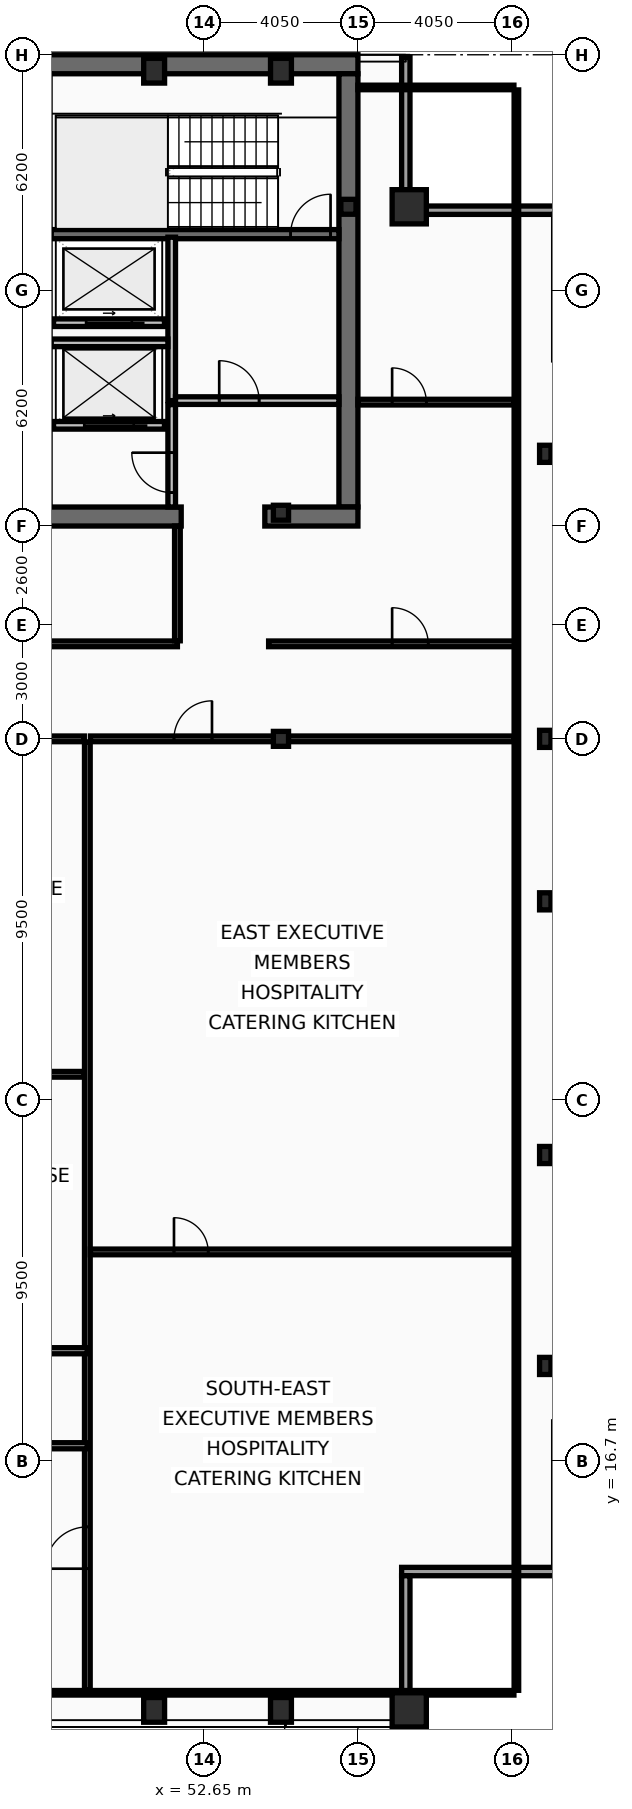
"""IFC4 building model, lengths in metres.
Left out: names, types, materials, properties, quantities, classifications, styles, units other than length and angle.
Written with IfcOpenShell. Run it as: python <this file> out.ifc"""

import sys

from ifc_helpers import new_model, si_unit, direction, frame, frame_2d, origin, origin_2d, place, context, subcontext, project, spatial, rectangle, hollow_rectangle, i_section, extrude, element, fill, save


model = new_model("IFC4")
c1 = context("Model", 3, precision=1e-05, world=origin(), true_north=direction((0.0, 1.0)))
c2 = subcontext(c1, "Body", "Model", "MODEL_VIEW")
j1 = project(units=[si_unit("LENGTHUNIT", "METRE"), si_unit("PLANEANGLEUNIT", "RADIAN")], contexts=[c1])
p1 = place(None, origin())
s1 = spatial("IfcSite", under=j1, at=p1, CompositionType="ELEMENT")
p2 = place(p1, origin())
s2 = spatial("IfcBuilding", under=s1, at=p2, CompositionType="ELEMENT")
p3 = place(p2, frame((0.0, 0.0, 314.6)))
s3 = spatial("IfcBuildingStorey", under=s2, at=p3, CompositionType="ELEMENT", Elevation=314.6)
p4 = place(p3, frame((16.2, 53.45, 0.0), z_axis=(0.0, 0.0, 1.0), x_axis=(1.0, 0.0, 0.0)))
e1 = element("IfcWall", 1, at=p4, inside=s3, PredefinedType="SHEAR", context=c2, shape_type="SweptSolid", body=[
    extrude(rectangle(XDim=40.5, YDim=0.5, at=frame_2d((20.25, 0.0))), origin(), (0.0, 0.0, 1.0), 3.44),
])
p5 = place(p3, frame((56.45, 53.2, 0.0), z_axis=(0.0, 0.0, 1.0), x_axis=(0.0, -1.0, 0.0)))
e2 = element("IfcWall", 2, at=p5, inside=s3, PredefinedType="SHEAR", context=c2, shape_type="SweptSolid", body=[
    extrude(rectangle(XDim=11.4, YDim=0.5, at=frame_2d((5.7, 0.0))), origin(), (0.0, 0.0, 1.0), 3.44),
])
p6 = place(p3, frame((52.05, 41.55, 0.0), z_axis=(0.0, 0.0, 1.0), x_axis=(-1.0, 0.0, 0.0)))
e3 = element("IfcWall", 3, at=p6, inside=s3, PredefinedType="SHEAR", context=c2, shape_type="SweptSolid", body=[
    extrude(rectangle(XDim=11.3, YDim=0.5, at=frame_2d((5.65, 0.0))), origin(), (0.0, 0.0, 1.0), 3.44),
])
p7 = place(p3, frame((56.7, 41.55, 0.0), z_axis=(0.0, 0.0, 1.0), x_axis=(-1.0, 0.0, 0.0)))
e4 = element("IfcWall", 4, at=p7, inside=s3, PredefinedType="SHEAR", context=c2, shape_type="SweptSolid", body=[
    extrude(rectangle(XDim=2.45, YDim=0.5, at=frame_2d((1.225, 0.0))), origin(), (0.0, 0.0, 1.0), 3.44),
])
p8 = place(p3, frame((48.63, 48.98, 0.0), z_axis=(0.0, 0.0, 1.0), x_axis=(1.0, 0.0, 0.0)))
e5 = element("IfcWall", 5, at=p8, inside=s3, PredefinedType="SHEAR", context=c2, shape_type="SweptSolid", body=[
    extrude(rectangle(XDim=7.57, YDim=0.24, at=frame_2d((3.785, 0.0))), origin(), (0.0, 0.0, 1.0), 3.44),
])
p9 = place(p8, frame((6.3, 0.0, 0.0)))
e6 = element("IfcOpeningElement", 6, at=p9, cuts=e5, PredefinedType="OPENING", context=c2, shape_type="SweptSolid", body=[
    extrude(rectangle(XDim=1.05, YDim=2.15, at=frame_2d((0.525, 1.075))), frame((0.0, 0.13, 0.0), z_axis=(0.0, -1.0, 0.0), x_axis=(1.0, 0.0, 0.0)), (0.0, 0.0, 1.0), 0.26),
])
for number, where, z_axis, x_axis in (
    (7, (58.05, 10.15, 0.0), (0.0, 0.0, 1.0), (1.0, 0.0, 0.0)),
    (8, (58.05, 49.7, 0.0), (0.0, 0.0, 1.0), (1.0, 0.0, 0.0)),
):
    element("IfcColumn", number, at=place(p3, frame(where, z_axis=z_axis, x_axis=x_axis)), inside=s3, PredefinedType="COLUMN", context=c2, shape_type="SweptSolid", body=[
        extrude(hollow_rectangle(XDim=0.9, YDim=0.9, WallThickness=0.05, at=origin_2d()), origin(), (0.0, 0.0, 1.0), 3.6),
    ])
for number, where, z_axis, x_axis in (
    (9, (51.337, 10.15, 0.0), (0.0, 0.0, 1.0), (1.0, 0.0, 0.0)),
    (10, (54.675, 10.15, 0.0), (0.0, 0.0, 1.0), (1.0, 0.0, 0.0)),
    (11, (51.337, 53.28, 0.0), (0.0, 0.0, 1.0), (1.0, 0.0, 0.0)),
    (12, (54.675, 53.28, 0.0), (0.0, 0.0, 1.0), (1.0, 0.0, 0.0)),
):
    element("IfcColumn", number, at=place(p3, frame(where, z_axis=z_axis, x_axis=x_axis)), inside=s3, PredefinedType="COLUMN", context=c2, shape_type="SweptSolid", body=[
        extrude(hollow_rectangle(XDim=0.55, YDim=0.65, WallThickness=0.04, at=origin_2d()), origin(), (0.0, 0.0, 1.0), 3.6),
    ])
for number, where, z_axis, x_axis in (
    (13, (61.63, 19.2, 0.0), (0.0, 0.0, 1.0), (1.0, 0.0, 0.0)),
    (14, (61.63, 24.75, 0.0), (0.0, 0.0, 1.0), (1.0, 0.0, 0.0)),
    (15, (61.63, 31.425, 0.0), (0.0, 0.0, 1.0), (1.0, 0.0, 0.0)),
    (16, (61.63, 35.7, 0.0), (0.0, 0.0, 1.0), (1.0, 0.0, 0.0)),
    (17, (61.63, 43.2, 0.0), (0.0, 0.0, 1.0), (1.0, 0.0, 0.0)),
):
    element("IfcColumn", number, at=place(p3, frame(where, z_axis=z_axis, x_axis=x_axis)), inside=s3, PredefinedType="COLUMN", context=c2, shape_type="SweptSolid", body=[
        extrude(i_section(OverallWidth=0.3, OverallDepth=0.45, WebThickness=0.014, FlangeThickness=0.026, at=origin_2d()), origin(), (0.0, 0.0, 1.0), 3.6),
    ])
for number, where, z_axis, x_axis in (
    (18, (56.45, 49.7, 0.0), (0.0, 0.0, 1.0), (1.0, 0.0, 0.0)),
    (19, (54.675, 35.7, 0.0), (0.0, 0.0, 1.0), (1.0, 0.0, 0.0)),
    (20, (54.675, 41.65, 0.0), (0.0, 0.0, 1.0), (1.0, 0.0, 0.0)),
):
    element("IfcColumn", number, at=place(p3, frame(where, z_axis=z_axis, x_axis=x_axis)), inside=s3, PredefinedType="COLUMN", context=c2, shape_type="SweptSolid", body=[
        extrude(i_section(OverallWidth=0.399, OverallDepth=0.393, WebThickness=0.023, FlangeThickness=0.037, at=origin_2d()), origin(), (0.0, 0.0, 1.0), 3.6),
    ])
p10 = place(p3, frame((57.96, 53.63, 0.0), z_axis=(0.0, 0.0, 1.0), x_axis=(0.0, -1.0, 0.0)))
e21 = element("IfcWall", 21, at=p10, inside=s3, PredefinedType="SOLIDWALL", context=c2, shape_type="SweptSolid", body=[
    extrude(rectangle(XDim=3.91, YDim=0.22, at=frame_2d((1.955, 0.0))), origin(), (0.0, 0.0, 1.0), 2.88),
])
for number, where, z_axis, x_axis in (
    (22, (57.85, 49.61, 0.0), (0.0, 0.0, 1.0), (1.0, 0.0, 0.0)),
    (23, (62.07, 13.79, 0.0), (0.0, 0.0, 1.0), (-1.0, 0.0, 0.0)),
):
    element("IfcWall", number, at=place(p3, frame(where, z_axis=z_axis, x_axis=x_axis)), inside=s3, PredefinedType="SOLIDWALL", context=c2, shape_type="SweptSolid", body=[
        extrude(rectangle(XDim=4.22, YDim=0.22, at=frame_2d((2.11, 0.0))), origin(), (0.0, 0.0, 1.0), 2.88),
    ])
p11 = place(p3, frame((57.96, 13.68, 0.0), z_axis=(0.0, 0.0, 1.0), x_axis=(0.0, -1.0, 0.0)))
e24 = element("IfcWall", 24, at=p11, inside=s3, PredefinedType="SOLIDWALL", context=c2, shape_type="SweptSolid", body=[
    extrude(rectangle(XDim=3.91, YDim=0.22, at=frame_2d((1.955, 0.0))), origin(), (0.0, 0.0, 1.0), 2.88),
])
p12 = place(p3, frame((51.61, 43.95, 0.0), z_axis=(0.0, 0.0, 1.0), x_axis=(-1.0, 0.0, 0.0)))
e25 = element("IfcWall", 25, at=p12, inside=s3, PredefinedType="PARTITIONING", context=c2, shape_type="SweptSolid", body=[
    extrude(rectangle(XDim=2.92, YDim=0.2, at=frame_2d((1.46, 0.0))), origin(), (0.0, 0.0, 1.0), 3.44),
])
p13 = place(p12, frame((0.81, 0.0, 0.0)))
e26 = element("IfcOpeningElement", 26, at=p13, cuts=e25, PredefinedType="OPENING", context=c2, shape_type="SweptSolid", body=[
    extrude(rectangle(XDim=1.3, YDim=2.18, at=frame_2d((0.65, 1.09))), frame((0.0, 0.11, 0.0), z_axis=(0.0, -1.0, 0.0), x_axis=(1.0, 0.0, 0.0)), (0.0, 0.0, 1.0), 0.22),
])
p14 = place(p3, frame((51.61, 46.65, 0.0), z_axis=(0.0, 0.0, 1.0), x_axis=(-1.0, 0.0, 0.0)))
e27 = element("IfcWall", 27, at=p14, inside=s3, PredefinedType="PARTITIONING", context=c2, shape_type="SweptSolid", body=[
    extrude(rectangle(XDim=2.92, YDim=0.2, at=frame_2d((1.46, 0.0))), origin(), (0.0, 0.0, 1.0), 3.44),
])
p15 = place(p14, frame((0.86, 0.0, 0.0)))
e28 = element("IfcOpeningElement", 28, at=p15, cuts=e27, PredefinedType="OPENING", context=c2, shape_type="SweptSolid", body=[
    extrude(rectangle(XDim=1.2, YDim=2.18, at=frame_2d((0.6, 1.09))), frame((0.0, 0.11, 0.0), z_axis=(0.0, -1.0, 0.0), x_axis=(1.0, 0.0, 0.0)), (0.0, 0.0, 1.0), 0.22),
])
p16 = place(p3, frame((51.8, 44.6, 0.0), z_axis=(0.0, 0.0, 1.0), x_axis=(0.0, 1.0, 0.0)))
e29 = element("IfcWall", 29, at=p16, inside=s3, PredefinedType="PARTITIONING", context=c2, shape_type="SweptSolid", body=[
    extrude(rectangle(XDim=4.3, YDim=0.2, at=frame_2d((2.15, 0.0))), origin(), (0.0, 0.0, 1.0), 3.44),
])
p17 = place(p3, frame((51.9, 44.6, 0.0), z_axis=(0.0, 0.0, 1.0), x_axis=(1.0, 0.0, 0.0)))
e30 = element("IfcWall", 30, at=p17, inside=s3, PredefinedType="PARTITIONING", context=c2, shape_type="SweptSolid", body=[
    extrude(rectangle(XDim=4.3, YDim=0.2, at=frame_2d((2.15, 0.0))), origin(), (0.0, 0.0, 1.0), 3.44),
])
p18 = place(p17, frame((1.15, 0.0, 0.0)))
e31 = element("IfcOpeningElement", 31, at=p18, cuts=e30, PredefinedType="OPENING", context=c2, shape_type="SweptSolid", body=[
    extrude(rectangle(XDim=1.05, YDim=2.15, at=frame_2d((0.525, 1.075))), frame((0.0, 0.11, 0.0), z_axis=(0.0, -1.0, 0.0), x_axis=(1.0, 0.0, 0.0)), (0.0, 0.0, 1.0), 0.22),
])
p19 = place(p3, frame((48.63, 46.12, 0.0), z_axis=(0.0, 0.0, 1.0), x_axis=(1.0, 0.0, 0.0)))
e32 = element("IfcWall", 32, at=p19, inside=s3, PredefinedType="PARTITIONING", context=c2, shape_type="SweptSolid", body=[
    extrude(rectangle(XDim=3.07, YDim=0.2, at=frame_2d((1.535, 0.0))), origin(), (0.0, 0.0, 1.0), 3.44),
])
p20 = place(p3, frame((51.8, 41.8, 0.0), z_axis=(0.0, 0.0, 1.0), x_axis=(0.0, 1.0, 0.0)))
e33 = element("IfcWall", 33, at=p20, inside=s3, PredefinedType="PARTITIONING", context=c2, shape_type="SweptSolid", body=[
    extrude(rectangle(XDim=2.695, YDim=0.2, at=frame_2d((1.348, 0.0))), origin(), (0.0, 0.0, 1.0), 3.44),
])
p21 = place(p20, frame((0.38, 0.0, 0.0)))
e34 = element("IfcOpeningElement", 34, at=p21, cuts=e33, PredefinedType="OPENING", context=c2, shape_type="SweptSolid", body=[
    extrude(rectangle(XDim=1.05, YDim=2.15, at=frame_2d((0.525, 1.075))), frame((0.0, 0.11, 0.0), z_axis=(0.0, -1.0, 0.0), x_axis=(1.0, 0.0, 0.0)), (0.0, 0.0, 1.0), 0.22),
])
p22 = place(p3, frame((46.3, 38.2, 0.0), z_axis=(0.0, 0.0, 1.0), x_axis=(1.0, 0.0, 0.0)))
e35 = element("IfcWall", 35, at=p22, inside=s3, PredefinedType="PARTITIONING", context=c2, shape_type="SweptSolid", body=[
    extrude(rectangle(XDim=5.65, YDim=0.15, at=frame_2d((2.825, 0.0))), origin(), (0.0, 0.0, 1.0), 2.83),
])
p23 = place(p22, frame((1.1, 0.0, 0.0)))
e36 = element("IfcOpeningElement", 36, at=p23, cuts=e35, PredefinedType="OPENING", context=c2, shape_type="SweptSolid", body=[
    extrude(rectangle(XDim=1.0, YDim=2.05, at=frame_2d((0.5, 1.025))), frame((0.0, 0.085, 0.0), z_axis=(0.0, -1.0, 0.0), x_axis=(1.0, 0.0, 0.0)), (0.0, 0.0, 1.0), 0.17),
])
p24 = place(p3, frame((51.95, 38.28, 0.0), z_axis=(0.0, 0.0, 1.0), x_axis=(0.0, 1.0, 0.0)))
e37 = element("IfcWall", 37, at=p24, inside=s3, PredefinedType="PARTITIONING", context=c2, shape_type="SweptSolid", body=[
    extrude(rectangle(XDim=3.02, YDim=0.15, at=frame_2d((1.51, 0.0))), origin(), (0.0, 0.0, 1.0), 3.44),
])
p25 = place(p3, frame((54.35, 38.2, 0.0), z_axis=(0.0, 0.0, 1.0), x_axis=(1.0, 0.0, 0.0)))
e38 = element("IfcWall", 38, at=p25, inside=s3, PredefinedType="PARTITIONING", context=c2, shape_type="SweptSolid", body=[
    extrude(rectangle(XDim=6.52, YDim=0.15, at=frame_2d((3.26, 0.0))), origin(), (0.0, 0.0, 1.0), 2.83),
])
p26 = place(p25, frame((3.25, 0.0, 0.0)))
e39 = element("IfcOpeningElement", 39, at=p26, cuts=e38, PredefinedType="OPENING", context=c2, shape_type="SweptSolid", body=[
    extrude(rectangle(XDim=0.95, YDim=2.05, at=frame_2d((0.475, 1.025))), frame((0.0, 0.085, 0.0), z_axis=(0.0, -1.0, 0.0), x_axis=(1.0, 0.0, 0.0)), (0.0, 0.0, 1.0), 0.17),
])
p27 = place(p3, frame((56.7, 44.56, 0.0), z_axis=(0.0, 0.0, 1.0), x_axis=(1.0, 0.0, 0.0)))
e40 = element("IfcWall", 40, at=p27, inside=s3, PredefinedType="PARTITIONING", context=c2, shape_type="SweptSolid", body=[
    extrude(rectangle(XDim=4.105, YDim=0.15, at=frame_2d((2.052, 0.0))), origin(), (0.0, 0.0, 1.0), 2.88),
])
p28 = place(p27, frame((0.9, 0.0, 0.0)))
e41 = element("IfcOpeningElement", 41, at=p28, cuts=e40, PredefinedType="OPENING", context=c2, shape_type="SweptSolid", body=[
    extrude(rectangle(XDim=0.9, YDim=2.05, at=frame_2d((0.45, 1.025))), frame((0.0, 0.085, 0.0), z_axis=(0.0, -1.0, 0.0), x_axis=(1.0, 0.0, 0.0)), (0.0, 0.0, 1.0), 0.17),
])
p29 = place(p3, frame((49.58, 10.665, 0.0), z_axis=(0.0, 0.0, 1.0), x_axis=(0.0, 1.0, 0.0)))
e42 = element("IfcWall", 42, at=p29, inside=s3, PredefinedType="PARTITIONING", context=c2, shape_type="SweptSolid", body=[
    extrude(rectangle(XDim=24.955, YDim=0.15, at=frame_2d((12.478, 0.0))), origin(), (0.0, 0.0, 1.0), 3.07),
])
p30 = place(p29, frame((3.2, 0.0, 0.0)))
e43 = element("IfcOpeningElement", 43, at=p30, cuts=e42, PredefinedType="OPENING", context=c2, shape_type="SweptSolid", body=[
    extrude(rectangle(XDim=1.1, YDim=2.1, at=frame_2d((0.55, 1.05))), frame((0.0, 0.085, 0.0), z_axis=(0.0, -1.0, 0.0), x_axis=(1.0, 0.0, 0.0)), (0.0, 0.0, 1.0), 0.17),
])
p31 = place(p3, frame((24.48, 35.7, 0.0), z_axis=(0.0, 0.0, 1.0), x_axis=(1.0, 0.0, 0.0)))
e44 = element("IfcWall", 44, at=p31, inside=s3, PredefinedType="PARTITIONING", context=c2, shape_type="SweptSolid", body=[
    extrude(rectangle(XDim=25.02, YDim=0.15, at=frame_2d((12.51, 0.0))), origin(), (0.0, 0.0, 1.0), 2.83),
])
p32 = place(p3, frame((49.66, 35.7, 0.0), z_axis=(0.0, 0.0, 1.0), x_axis=(1.0, 0.0, 0.0)))
e45 = element("IfcWall", 45, at=p32, inside=s3, PredefinedType="PARTITIONING", context=c2, shape_type="SweptSolid", body=[
    extrude(rectangle(XDim=11.145, YDim=0.15, at=frame_2d((5.573, 0.0))), origin(), (0.0, 0.0, 1.0), 2.83),
])
p33 = place(p32, frame((2.2, 0.0, 0.0)))
e46 = element("IfcOpeningElement", 46, at=p33, cuts=e45, PredefinedType="OPENING", context=c2, shape_type="SweptSolid", body=[
    extrude(rectangle(XDim=1.0, YDim=2.05, at=frame_2d((0.5, 1.025))), frame((0.0, 0.085, 0.0), z_axis=(0.0, -1.0, 0.0), x_axis=(1.0, 0.0, 0.0)), (0.0, 0.0, 1.0), 0.17),
])
p34 = place(p3, frame((49.66, 22.2, 0.0), z_axis=(0.0, 0.0, 1.0), x_axis=(1.0, 0.0, 0.0)))
e47 = element("IfcWall", 47, at=p34, inside=s3, PredefinedType="PARTITIONING", context=c2, shape_type="SweptSolid", body=[
    extrude(rectangle(XDim=11.145, YDim=0.15, at=frame_2d((5.573, 0.0))), origin(), (0.0, 0.0, 1.0), 2.83),
])
p35 = place(p34, frame((2.2, 0.0, 0.0)))
e48 = element("IfcOpeningElement", 48, at=p35, cuts=e47, PredefinedType="OPENING", context=c2, shape_type="SweptSolid", body=[
    extrude(rectangle(XDim=0.9, YDim=2.05, at=frame_2d((0.45, 1.025))), frame((0.0, 0.085, 0.0), z_axis=(0.0, -1.0, 0.0), x_axis=(1.0, 0.0, 0.0)), (0.0, 0.0, 1.0), 0.17),
])
p36 = place(p3, frame((42.65, 19.6, 0.0), z_axis=(0.0, 0.0, 1.0), x_axis=(1.0, 0.0, 0.0)))
e49 = element("IfcWall", 49, at=p36, inside=s3, PredefinedType="PARTITIONING", context=c2, shape_type="SweptSolid", body=[
    extrude(rectangle(XDim=6.93, YDim=0.16, at=frame_2d((3.465, 0.0))), origin(), (0.0, 0.0, 1.0), 2.83),
])
p37 = place(p36, frame((3.161, 0.0, 0.0)))
e50 = element("IfcOpeningElement", 50, at=p37, cuts=e49, PredefinedType="OPENING", context=c2, shape_type="SweptSolid", body=[
    extrude(rectangle(XDim=1.0, YDim=2.05, at=frame_2d((0.5, 1.025))), frame((0.0, 0.09, 0.0), z_axis=(0.0, -1.0, 0.0), x_axis=(1.0, 0.0, 0.0)), (0.0, 0.0, 1.0), 0.18),
])
p38 = place(p3, frame((42.73, 26.874, 0.0), z_axis=(0.0, 0.0, 1.0), x_axis=(1.0, 0.0, 0.0)))
e51 = element("IfcWall", 51, at=p38, inside=s3, PredefinedType="PARTITIONING", context=c2, shape_type="SweptSolid", body=[
    extrude(rectangle(XDim=6.77, YDim=0.15, at=frame_2d((3.385, 0.0))), origin(), (0.0, 0.0, 1.0), 2.83),
])
p39 = place(p38, frame((3.119, 0.0, 0.0)))
e52 = element("IfcOpeningElement", 52, at=p39, cuts=e51, PredefinedType="OPENING", context=c2, shape_type="SweptSolid", body=[
    extrude(rectangle(XDim=0.9, YDim=2.05, at=frame_2d((0.45, 1.025))), frame((0.0, 0.085, 0.0), z_axis=(0.0, -1.0, 0.0), x_axis=(1.0, 0.0, 0.0)), (0.0, 0.0, 1.0), 0.17),
])
p40 = place(p3, frame((40.32, 17.1, 0.0), z_axis=(0.0, 0.0, 1.0), x_axis=(1.0, 0.0, 0.0)))
e53 = element("IfcWall", 53, at=p40, inside=s3, PredefinedType="PARTITIONING", context=c2, shape_type="SweptSolid", body=[
    extrude(rectangle(XDim=9.26, YDim=0.16, at=frame_2d((4.63, 0.0))), origin(), (0.0, 0.0, 1.0), 2.83),
])
p41 = place(p40, frame((4.139, 0.0, 0.0)))
e54 = element("IfcOpeningElement", 54, at=p41, cuts=e53, PredefinedType="OPENING", context=c2, shape_type="SweptSolid", body=[
    extrude(rectangle(XDim=1.0, YDim=2.05, at=frame_2d((0.5, 1.025))), frame((0.0, 0.09, 0.0), z_axis=(0.0, -1.0, 0.0), x_axis=(1.0, 0.0, 0.0)), (0.0, 0.0, 1.0), 0.18),
])
p42 = place(p3, frame((60.87, 10.665, 0.0), z_axis=(0.0, 0.0, 1.0), x_axis=(0.0, 1.0, 0.0)))
e55 = element("IfcWall", 55, at=p42, inside=s3, PredefinedType="PARTITIONING", context=c2, shape_type="SweptSolid", body=[
    extrude(rectangle(XDim=42.11, YDim=0.12, at=frame_2d((21.055, 0.0))), origin(), (0.0, 0.0, 1.0), 2.83),
])
p43 = place(p3, frame((56.7, 52.84, 0.0), z_axis=(0.0, 0.0, 1.0), x_axis=(1.0, 0.0, 0.0)))
e56 = element("IfcWall", 56, at=p43, inside=s3, PredefinedType="PARTITIONING", context=c2, shape_type="SweptSolid", body=[
    extrude(rectangle(XDim=4.105, YDim=0.12, at=frame_2d((2.052, 0.0))), origin(), (0.0, 0.0, 1.0), 3.44),
])
p44 = place(p3, frame((12.095, 10.6, 0.0), z_axis=(0.0, 0.0, 1.0), x_axis=(1.0, 0.0, 0.0)))
e57 = element("IfcWall", 57, at=p44, inside=s3, PredefinedType="PARTITIONING", context=c2, shape_type="SweptSolid", body=[
    extrude(rectangle(XDim=48.71, YDim=0.12, at=frame_2d((24.355, 0.0))), origin(), (0.0, 0.0, 1.0), 2.83),
])
p45 = place(p9, origin())
e58 = element("IfcDoor", 58, at=p45, inside=s3, OperationType="SINGLE_SWING_RIGHT", PredefinedType="DOOR", context=c2, shape_type="SweptSolid", body=[
    extrude(rectangle(XDim=1.05, YDim=2.15, at=frame_2d((0.525, 1.075))), frame((0.0, 0.025, 0.0), z_axis=(0.0, -1.0, 0.0), x_axis=(1.0, 0.0, 0.0)), (0.0, 0.0, 1.0), 0.05),
])
fill(e6, e58)
p46 = place(p13, origin())
e59 = element("IfcDoor", 59, at=p46, inside=s3, OperationType="SLIDING_TO_LEFT", PredefinedType="DOOR", context=c2, shape_type="SweptSolid", body=[
    extrude(rectangle(XDim=1.3, YDim=2.18, at=frame_2d((0.65, 1.09))), frame((0.0, 0.025, 0.0), z_axis=(0.0, -1.0, 0.0), x_axis=(1.0, 0.0, 0.0)), (0.0, 0.0, 1.0), 0.05),
])
fill(e26, e59)
p47 = place(p15, origin())
e60 = element("IfcDoor", 60, at=p47, inside=s3, OperationType="SLIDING_TO_LEFT", PredefinedType="DOOR", context=c2, shape_type="SweptSolid", body=[
    extrude(rectangle(XDim=1.2, YDim=2.18, at=frame_2d((0.6, 1.09))), frame((0.0, 0.025, 0.0), z_axis=(0.0, -1.0, 0.0), x_axis=(1.0, 0.0, 0.0)), (0.0, 0.0, 1.0), 0.05),
])
fill(e28, e60)
p48 = place(p18, origin())
e61 = element("IfcDoor", 61, at=p48, inside=s3, OperationType="SINGLE_SWING_LEFT", PredefinedType="DOOR", context=c2, shape_type="SweptSolid", body=[
    extrude(rectangle(XDim=1.05, YDim=2.15, at=frame_2d((0.525, 1.075))), frame((0.0, 0.025, 0.0), z_axis=(0.0, -1.0, 0.0), x_axis=(1.0, 0.0, 0.0)), (0.0, 0.0, 1.0), 0.05),
])
fill(e31, e61)
p49 = place(p21, origin())
e62 = element("IfcDoor", 62, at=p49, inside=s3, OperationType="SINGLE_SWING_RIGHT", PredefinedType="DOOR", context=c2, shape_type="SweptSolid", body=[
    extrude(rectangle(XDim=1.05, YDim=2.15, at=frame_2d((0.525, 1.075))), frame((0.0, 0.025, 0.0), z_axis=(0.0, -1.0, 0.0), x_axis=(1.0, 0.0, 0.0)), (0.0, 0.0, 1.0), 0.05),
])
fill(e34, e62)
p50 = place(p26, origin())
e63 = element("IfcDoor", 63, at=p50, inside=s3, OperationType="SINGLE_SWING_LEFT", PredefinedType="DOOR", context=c2, shape_type="SweptSolid", body=[
    extrude(rectangle(XDim=0.95, YDim=2.05, at=frame_2d((0.475, 1.025))), frame((0.0, 0.025, 0.0), z_axis=(0.0, -1.0, 0.0), x_axis=(1.0, 0.0, 0.0)), (0.0, 0.0, 1.0), 0.05),
])
fill(e39, e63)
p51 = place(p28, origin())
e64 = element("IfcDoor", 64, at=p51, inside=s3, OperationType="SINGLE_SWING_LEFT", PredefinedType="DOOR", context=c2, shape_type="SweptSolid", body=[
    extrude(rectangle(XDim=0.9, YDim=2.05, at=frame_2d((0.45, 1.025))), frame((0.0, 0.025, 0.0), z_axis=(0.0, -1.0, 0.0), x_axis=(1.0, 0.0, 0.0)), (0.0, 0.0, 1.0), 0.05),
])
fill(e41, e64)
p52 = place(p30, origin())
e65 = element("IfcDoor", 65, at=p52, inside=s3, OperationType="SINGLE_SWING_LEFT", PredefinedType="DOOR", context=c2, shape_type="SweptSolid", body=[
    extrude(rectangle(XDim=1.1, YDim=2.1, at=frame_2d((0.55, 1.05))), frame((0.0, 0.025, 0.0), z_axis=(0.0, -1.0, 0.0), x_axis=(1.0, 0.0, 0.0)), (0.0, 0.0, 1.0), 0.05),
])
fill(e43, e65)
p53 = place(p33, origin())
e66 = element("IfcDoor", 66, at=p53, inside=s3, OperationType="SINGLE_SWING_RIGHT", PredefinedType="DOOR", context=c2, shape_type="SweptSolid", body=[
    extrude(rectangle(XDim=1.0, YDim=2.05, at=frame_2d((0.5, 1.025))), frame((0.0, 0.025, 0.0), z_axis=(0.0, -1.0, 0.0), x_axis=(1.0, 0.0, 0.0)), (0.0, 0.0, 1.0), 0.05),
])
fill(e46, e66)
p54 = place(p35, origin())
e67 = element("IfcDoor", 67, at=p54, inside=s3, OperationType="SINGLE_SWING_LEFT", PredefinedType="DOOR", context=c2, shape_type="SweptSolid", body=[
    extrude(rectangle(XDim=0.9, YDim=2.05, at=frame_2d((0.45, 1.025))), frame((0.0, 0.025, 0.0), z_axis=(0.0, -1.0, 0.0), x_axis=(1.0, 0.0, 0.0)), (0.0, 0.0, 1.0), 0.05),
])
fill(e48, e67)
save(model, sys.argv[1])
